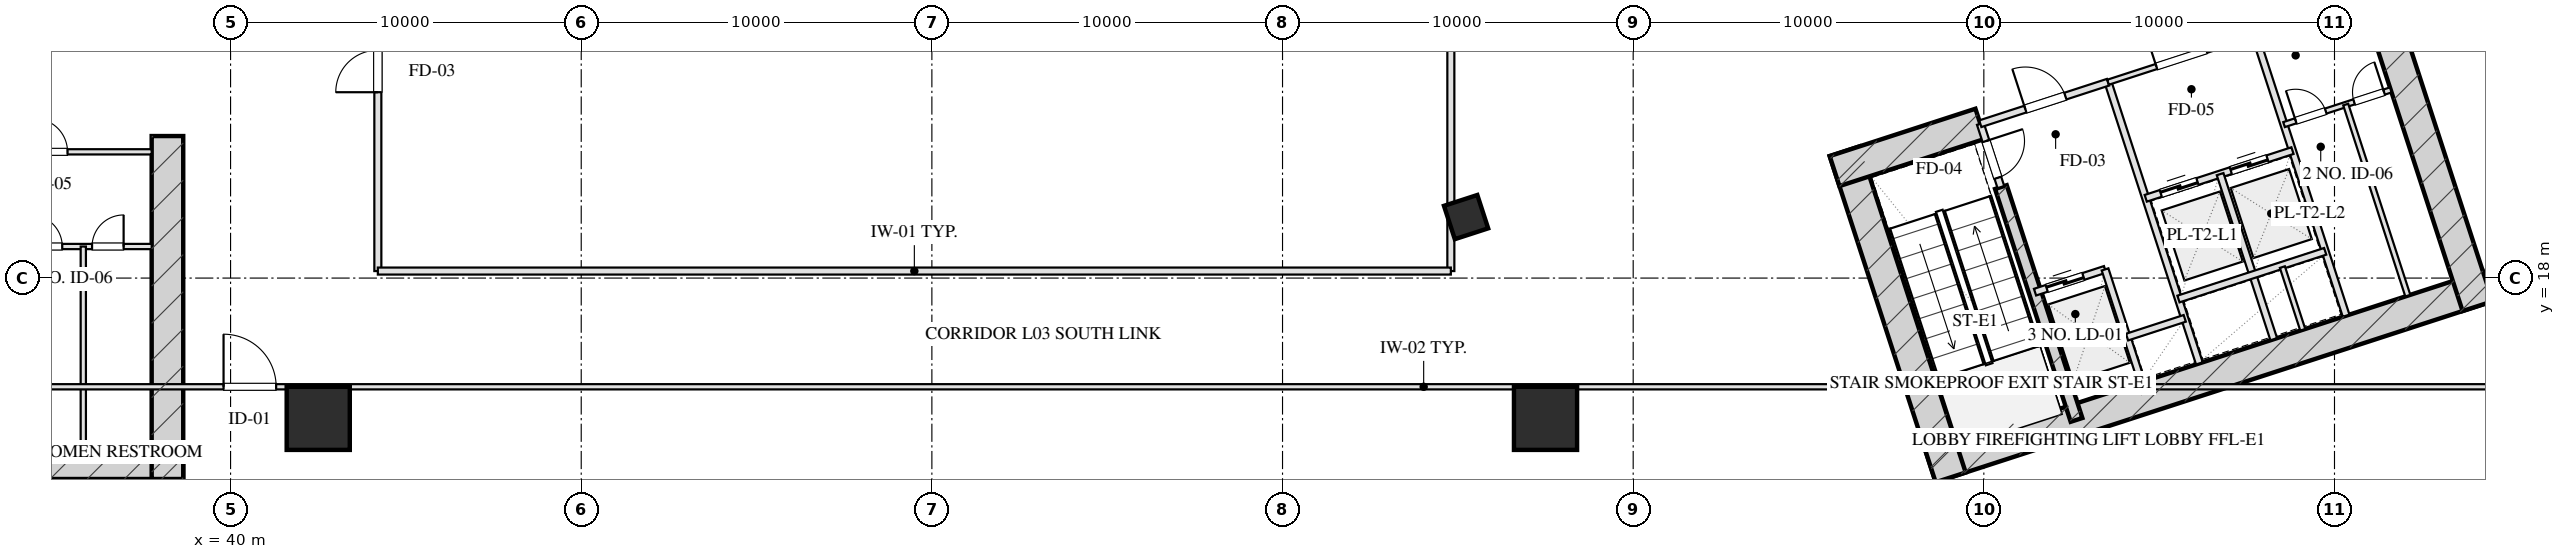
"""IFC4 building model, lengths in metres.
Left out: names, types, materials, properties, quantities, classifications, styles, units other than length and angle.
Written with IfcOpenShell. Run it as: python <this file> out.ifc"""

import sys

from ifc_helpers import new_model, si_unit, direction, frame, frame_2d, origin, origin_2d, place, context, subcontext, project, spatial, rectangle, hollow_rectangle, extrude, element, fill, save


model = new_model("IFC4")
c1 = context("Model", 3, precision=1e-05, world=origin(), true_north=direction((0.0, 1.0)))
c2 = subcontext(c1, "Body", "Model", "MODEL_VIEW")
j1 = project(units=[si_unit("LENGTHUNIT", "METRE"), si_unit("PLANEANGLEUNIT", "RADIAN")], contexts=[c1])
p1 = place(None, origin())
s1 = spatial("IfcSite", under=j1, at=p1, CompositionType="ELEMENT")
p2 = place(p1, origin())
s2 = spatial("IfcBuilding", under=s1, at=p2, CompositionType="ELEMENT")
p3 = place(p2, frame((0.0, 0.0, 16.5)))
s3 = spatial("IfcBuildingStorey", under=s2, at=p3, CompositionType="ELEMENT", Elevation=16.5)
p4 = place(p3, frame((21.35, 12.72, 0.0), z_axis=(0.0, 0.0, 1.0), x_axis=(1.0, 0.0, 0.0)))
e1 = element("IfcWall", 1, at=p4, inside=s3, PredefinedType="SHEAR", context=c2, shape_type="SweptSolid", body=[
    extrude(rectangle(XDim=17.3, YDim=0.9, at=frame_2d((8.65, 0.0))), origin(), (0.0, 0.0, 1.0), 5.5),
])
p5 = place(p3, frame((38.2, 22.05, 0.0), z_axis=(0.0, 0.0, 1.0), x_axis=(0.0, -1.0, 0.0)))
e2 = element("IfcWall", 2, at=p5, inside=s3, PredefinedType="SHEAR", context=c2, shape_type="SweptSolid", body=[
    extrude(rectangle(XDim=9.78, YDim=0.9, at=frame_2d((4.89, 0.0))), origin(), (0.0, 0.0, 1.0), 5.5),
])
p6 = place(p3, frame((88.487, 12.605, 0.0), z_axis=(0.0, 0.0, 1.0), x_axis=(0.951055016115, 0.309021611416, 0.0)))
e3 = element("IfcWall", 3, at=p6, inside=s3, PredefinedType="SHEAR", context=c2, shape_type="SweptSolid", body=[
    extrude(rectangle(XDim=16.7, YDim=0.9, at=frame_2d((8.35, 0.0))), origin(), (0.0, 0.0, 1.0), 5.5),
])
p7 = place(p3, frame((86.032, 21.618, 0.0), z_axis=(0.0, 0.0, 1.0), x_axis=(0.30901438634, -0.951057363693, 0.0)))
e4 = element("IfcWall", 4, at=p7, inside=s3, PredefinedType="SHEAR", context=c2, shape_type="SweptSolid", body=[
    extrude(rectangle(XDim=9.78, YDim=0.9, at=frame_2d((4.89, 0.0))), origin(), (0.0, 0.0, 1.0), 5.5),
])
p8 = place(p3, frame((101.059, 26.5, 0.0), z_axis=(0.0, 0.0, 1.0), x_axis=(0.309021722829, -0.951054979914, 0.0)))
e5 = element("IfcWall", 5, at=p8, inside=s3, PredefinedType="SHEAR", context=c2, shape_type="SweptSolid", body=[
    extrude(rectangle(XDim=9.78, YDim=0.9, at=frame_2d((4.89, 0.0))), origin(), (0.0, 0.0, 1.0), 5.5),
])
p9 = place(p3, frame((90.486, 20.594, 0.0), z_axis=(0.0, 0.0, 1.0), x_axis=(0.309020428229, -0.951055400562, 0.0)))
e6 = element("IfcWall", 6, at=p9, inside=s3, PredefinedType="SHEAR", context=c2, shape_type="SweptSolid", body=[
    extrude(rectangle(XDim=6.98, YDim=0.35, at=frame_2d((3.49, 0.0))), origin(), (0.0, 0.0, 1.0), 5.5),
])
p10 = place(p3, frame((85.743, 21.051, 0.0), z_axis=(0.0, 0.0, 1.0), x_axis=(0.951063623806, 0.308995118848, 0.0)))
e7 = element("IfcWall", 7, at=p10, inside=s3, PredefinedType="SHEAR", context=c2, shape_type="SweptSolid", body=[
    extrude(rectangle(XDim=4.37, YDim=0.9, at=frame_2d((2.185, 0.0))), origin(), (0.0, 0.0, 1.0), 5.5),
])
for number, where, z_axis, x_axis in (
    (8, (42.5, 14.0, 0.0), (0.0, 0.0, 1.0), (1.0, 0.0, 0.0)),
    (9, (77.5, 14.0, 0.0), (0.0, 0.0, 1.0), (1.0, 0.0, 0.0)),
):
    element("IfcColumn", number, at=place(p3, frame(where, z_axis=z_axis, x_axis=x_axis)), inside=s3, PredefinedType="COLUMN", context=c2, shape_type="SweptSolid", body=[
        extrude(hollow_rectangle(XDim=1.8, YDim=1.8, WallThickness=0.06, at=origin_2d()), origin(), (0.0, 0.0, 1.0), 5.501),
    ])
p11 = place(p3, frame((75.234, 19.739, 0.0), z_axis=(0.0, 0.0, 1.0), x_axis=(0.951056516295, 0.309016994375, 0.0)))
e10 = element("IfcColumn", 10, at=p11, inside=s3, PredefinedType="COLUMN", context=c2, shape_type="SweptSolid", body=[
    extrude(hollow_rectangle(XDim=1.0, YDim=1.0, WallThickness=0.036, at=origin_2d()), origin(), (0.0, 0.0, 1.0), 5.501),
])
p12 = place(p3, frame((33.95, 21.6, 0.0), z_axis=(0.0, 0.0, 1.0), x_axis=(1.0, 0.0, 0.0)))
e11 = element("IfcWall", 11, at=p12, inside=s3, PredefinedType="PARTITIONING", context=c2, shape_type="SweptSolid", body=[
    extrude(rectangle(XDim=3.8, YDim=0.15, at=frame_2d((1.9, 0.0))), origin(), (0.0, 0.0, 1.0), 5.185),
])
p13 = place(p12, frame((0.45, 0.0, 0.0)))
e12 = element("IfcOpeningElement", 12, at=p13, cuts=e11, PredefinedType="OPENING", context=c2, shape_type="SweptSolid", body=[
    extrude(rectangle(XDim=0.95, YDim=2.05, at=frame_2d((0.475, 1.025))), frame((0.0, 0.085, 0.0), z_axis=(0.0, -1.0, 0.0), x_axis=(1.0, 0.0, 0.0)), (0.0, 0.0, 1.0), 0.17),
])
p14 = place(p3, frame((33.95, 18.9, 0.0), z_axis=(0.0, 0.0, 1.0), x_axis=(1.0, 0.0, 0.0)))
e13 = element("IfcWall", 13, at=p14, inside=s3, PredefinedType="PARTITIONING", context=c2, shape_type="SweptSolid", body=[
    extrude(rectangle(XDim=3.8, YDim=0.15, at=frame_2d((1.9, 0.0))), origin(), (0.0, 0.0, 1.0), 5.185),
])
p15 = place(p14, frame((0.35, 0.0, 0.0)))
e14 = element("IfcOpeningElement", 14, at=p15, cuts=e13, PredefinedType="OPENING", context=c2, shape_type="SweptSolid", body=[
    extrude(rectangle(XDim=0.9, YDim=2.05, at=frame_2d((0.45, 1.025))), frame((0.0, 0.085, 0.0), z_axis=(0.0, -1.0, 0.0), x_axis=(1.0, 0.0, 0.0)), (0.0, 0.0, 1.0), 0.17),
])
p16 = place(p14, frame((2.1, 0.0, 0.0)))
e15 = element("IfcOpeningElement", 15, at=p16, cuts=e13, PredefinedType="OPENING", context=c2, shape_type="SweptSolid", body=[
    extrude(rectangle(XDim=0.9, YDim=2.05, at=frame_2d((0.45, 1.025))), frame((0.0, 0.085, 0.0), z_axis=(0.0, -1.0, 0.0), x_axis=(1.0, 0.0, 0.0)), (0.0, 0.0, 1.0), 0.17),
])
p17 = place(p3, frame((35.8, 18.9, 0.0), z_axis=(0.0, 0.0, 1.0), x_axis=(0.0, -1.0, 0.0)))
e16 = element("IfcWall", 16, at=p17, inside=s3, PredefinedType="PARTITIONING", context=c2, shape_type="SweptSolid", body=[
    extrude(rectangle(XDim=5.73, YDim=0.15, at=frame_2d((2.865, 0.0))), origin(), (0.0, 0.0, 1.0), 5.185),
])
p18 = place(p3, frame((89.899, 22.401, 0.0), z_axis=(0.0, 0.0, 1.0), x_axis=(0.308932062672, -0.951084108086, 0.0)))
e17 = element("IfcWall", 17, at=p18, inside=s3, PredefinedType="PARTITIONING", context=c2, shape_type="SweptSolid", body=[
    extrude(rectangle(XDim=1.9, YDim=0.2, at=frame_2d((0.95, 0.0))), origin(), (0.0, 0.0, 1.0), 5.185),
])
p19 = place(p18, frame((0.52, 0.0, 0.0)))
e18 = element("IfcOpeningElement", 18, at=p19, cuts=e17, PredefinedType="OPENING", context=c2, shape_type="SweptSolid", body=[
    extrude(rectangle(XDim=1.1, YDim=2.05, at=frame_2d((0.55, 1.025))), frame((0.0, 0.11, 0.0), z_axis=(0.0, -1.0, 0.0), x_axis=(1.0, 0.0, 0.0)), (0.0, 0.0, 1.0), 0.22),
])
p20 = place(p3, frame((93.542, 23.585, 0.0), z_axis=(0.0, 0.0, 1.0), x_axis=(0.309042196757, -0.951048327176, 0.0)))
e19 = element("IfcWall", 19, at=p20, inside=s3, PredefinedType="PARTITIONING", context=c2, shape_type="SweptSolid", body=[
    extrude(rectangle(XDim=8.43, YDim=0.2, at=frame_2d((4.215, 0.0))), origin(), (0.0, 0.0, 1.0), 5.185),
])
p21 = place(p3, frame((89.899, 22.401, 0.0), z_axis=(0.0, 0.0, 1.0), x_axis=(0.951046716504, 0.309047153403, 0.0)))
e20 = element("IfcWall", 20, at=p21, inside=s3, PredefinedType="PARTITIONING", context=c2, shape_type="SweptSolid", body=[
    extrude(rectangle(XDim=3.83, YDim=0.2, at=frame_2d((1.915, 0.0))), origin(), (0.0, 0.0, 1.0), 5.185),
])
p22 = place(p21, frame((1.35, 0.0, 0.0)))
e21 = element("IfcOpeningElement", 21, at=p22, cuts=e20, PredefinedType="OPENING", context=c2, shape_type="SweptSolid", body=[
    extrude(rectangle(XDim=1.2, YDim=2.05, at=frame_2d((0.6, 1.025))), frame((0.0, 0.11, 0.0), z_axis=(0.0, -1.0, 0.0), x_axis=(1.0, 0.0, 0.0)), (0.0, 0.0, 1.0), 0.22),
])
p23 = place(p3, frame((91.46, 17.598, 0.0), z_axis=(0.0, 0.0, 1.0), x_axis=(0.951062257173, 0.308999325213, 0.0)))
e22 = element("IfcWall", 22, at=p23, inside=s3, PredefinedType="PARTITIONING", context=c2, shape_type="SweptSolid", body=[
    extrude(rectangle(XDim=2.1, YDim=0.2, at=frame_2d((1.05, 0.0))), origin(), (0.0, 0.0, 1.0), 5.185),
])
p24 = place(p23, frame((0.35, 0.0, 0.0)))
e23 = element("IfcOpeningElement", 23, at=p24, cuts=e22, PredefinedType="OPENING", context=c2, shape_type="SweptSolid", body=[
    extrude(rectangle(XDim=1.1, YDim=2.05, at=frame_2d((0.55, 1.025))), frame((0.0, 0.11, 0.0), z_axis=(0.0, -1.0, 0.0), x_axis=(1.0, 0.0, 0.0)), (0.0, 0.0, 1.0), 0.22),
])
p25 = place(p3, frame((93.457, 18.247, 0.0), z_axis=(0.0, 0.0, 1.0), x_axis=(0.3089935693, -0.951064127245, 0.0)))
e24 = element("IfcWall", 24, at=p25, inside=s3, PredefinedType="PARTITIONING", context=c2, shape_type="SweptSolid", body=[
    extrude(rectangle(XDim=3.7, YDim=0.2, at=frame_2d((1.85, 0.0))), origin(), (0.0, 0.0, 1.0), 5.185),
])
p26 = place(p3, frame((94.084, 16.317, 0.0), z_axis=(0.0, 0.0, 1.0), x_axis=(0.951041328149, 0.309063734775, 0.0)))
e25 = element("IfcWall", 25, at=p26, inside=s3, PredefinedType="PARTITIONING", context=c2, shape_type="SweptSolid", body=[
    extrude(rectangle(XDim=1.73, YDim=0.2, at=frame_2d((0.865, 0.0))), origin(), (0.0, 0.0, 1.0), 5.185),
])
p27 = place(p3, frame((97.727, 24.944, 0.0), z_axis=(0.0, 0.0, 1.0), x_axis=(0.309016001439, -0.951056838919, 0.0)))
e26 = element("IfcWall", 26, at=p27, inside=s3, PredefinedType="PARTITIONING", context=c2, shape_type="SweptSolid", body=[
    extrude(rectangle(XDim=8.43, YDim=0.2, at=frame_2d((4.215, 0.0))), origin(), (0.0, 0.0, 1.0), 5.185),
])
p28 = place(p3, frame((93.542, 23.585, 0.0), z_axis=(0.0, 0.0, 1.0), x_axis=(0.951063829732, 0.308994485023, 0.0)))
e27 = element("IfcWall", 27, at=p28, inside=s3, PredefinedType="PARTITIONING", context=c2, shape_type="SweptSolid", body=[
    extrude(rectangle(XDim=4.4, YDim=0.15, at=frame_2d((2.2, 0.0))), origin(), (0.0, 0.0, 1.0), 5.185),
])
p29 = place(p28, frame((1.45, 0.0, 0.0)))
e28 = element("IfcOpeningElement", 28, at=p29, cuts=e27, PredefinedType="OPENING", context=c2, shape_type="SweptSolid", body=[
    extrude(rectangle(XDim=1.5, YDim=2.05, at=frame_2d((0.75, 1.025))), frame((0.0, 0.085, 0.0), z_axis=(0.0, -1.0, 0.0), x_axis=(1.0, 0.0, 0.0)), (0.0, 0.0, 1.0), 0.17),
])
p30 = place(p3, frame((94.617, 20.275, 0.0), z_axis=(0.0, 0.0, 1.0), x_axis=(0.951058531764, 0.30901079133, 0.0)))
e29 = element("IfcWall", 29, at=p30, inside=s3, PredefinedType="PARTITIONING", context=c2, shape_type="SweptSolid", body=[
    extrude(rectangle(XDim=4.4, YDim=0.2, at=frame_2d((2.2, 0.0))), origin(), (0.0, 0.0, 1.0), 5.185),
])
p31 = place(p30, frame((0.45, 0.0, 0.0)))
e30 = element("IfcOpeningElement", 30, at=p31, cuts=e29, PredefinedType="OPENING", context=c2, shape_type="SweptSolid", body=[
    extrude(rectangle(XDim=1.1, YDim=2.05, at=frame_2d((0.55, 1.025))), frame((0.0, 0.11, 0.0), z_axis=(0.0, -1.0, 0.0), x_axis=(1.0, 0.0, 0.0)), (0.0, 0.0, 1.0), 0.22),
])
p32 = place(p30, frame((2.55, 0.0, 0.0)))
e31 = element("IfcOpeningElement", 31, at=p32, cuts=e29, PredefinedType="OPENING", context=c2, shape_type="SweptSolid", body=[
    extrude(rectangle(XDim=1.1, YDim=2.05, at=frame_2d((0.55, 1.025))), frame((0.0, 0.11, 0.0), z_axis=(0.0, -1.0, 0.0), x_axis=(1.0, 0.0, 0.0)), (0.0, 0.0, 1.0), 0.22),
])
p33 = place(p3, frame((96.738, 20.964, 0.0), z_axis=(0.0, 0.0, 1.0), x_axis=(0.309042578481, -0.951048203135, 0.0)))
e32 = element("IfcWall", 32, at=p33, inside=s3, PredefinedType="PARTITIONING", context=c2, shape_type="SweptSolid", body=[
    extrude(rectangle(XDim=4.95, YDim=0.2, at=frame_2d((2.475, 0.0))), origin(), (0.0, 0.0, 1.0), 5.185),
])
p34 = place(p3, frame((95.551, 17.403, 0.0), z_axis=(0.0, 0.0, 1.0), x_axis=(0.951058531764, 0.30901079133, 0.0)))
e33 = element("IfcWall", 33, at=p34, inside=s3, PredefinedType="PARTITIONING", context=c2, shape_type="SweptSolid", body=[
    extrude(rectangle(XDim=4.4, YDim=0.2, at=frame_2d((2.2, 0.0))), origin(), (0.0, 0.0, 1.0), 5.185),
])
p35 = place(p3, frame((98.514, 18.313, 0.0), z_axis=(0.0, 0.0, 1.0), x_axis=(0.309089008895, -0.951033114345, 0.0)))
e34 = element("IfcWall", 34, at=p35, inside=s3, PredefinedType="PARTITIONING", context=c2, shape_type="SweptSolid", body=[
    extrude(rectangle(XDim=1.88, YDim=0.15, at=frame_2d((0.94, 0.0))), origin(), (0.0, 0.0, 1.0), 5.185),
])
p36 = place(p3, frame((98.561, 22.376, 0.0), z_axis=(0.0, 0.0, 1.0), x_axis=(0.95104415986, 0.309055020985, 0.0)))
e35 = element("IfcWall", 35, at=p36, inside=s3, PredefinedType="PARTITIONING", context=c2, shape_type="SweptSolid", body=[
    extrude(rectangle(XDim=3.2, YDim=0.15, at=frame_2d((1.6, 0.0))), origin(), (0.0, 0.0, 1.0), 5.185),
])
p37 = place(p36, frame((0.35, 0.0, 0.0)))
e36 = element("IfcOpeningElement", 36, at=p37, cuts=e35, PredefinedType="OPENING", context=c2, shape_type="SweptSolid", body=[
    extrude(rectangle(XDim=0.9, YDim=2.05, at=frame_2d((0.45, 1.025))), frame((0.0, 0.085, 0.0), z_axis=(0.0, -1.0, 0.0), x_axis=(1.0, 0.0, 0.0)), (0.0, 0.0, 1.0), 0.17),
])
p38 = place(p36, frame((2.1, 0.0, 0.0)))
e37 = element("IfcOpeningElement", 37, at=p38, cuts=e35, PredefinedType="OPENING", context=c2, shape_type="SweptSolid", body=[
    extrude(rectangle(XDim=0.9, YDim=2.05, at=frame_2d((0.45, 1.025))), frame((0.0, 0.085, 0.0), z_axis=(0.0, -1.0, 0.0), x_axis=(1.0, 0.0, 0.0)), (0.0, 0.0, 1.0), 0.17),
])
p39 = place(p3, frame((100.32, 22.948, 0.0), z_axis=(0.0, 0.0, 1.0), x_axis=(0.309035009867, -0.951050662518, 0.0)))
e38 = element("IfcWall", 38, at=p39, inside=s3, PredefinedType="PARTITIONING", context=c2, shape_type="SweptSolid", body=[
    extrude(rectangle(XDim=5.73, YDim=0.15, at=frame_2d((2.865, 0.0))), origin(), (0.0, 0.0, 1.0), 5.185),
])
p40 = place(p3, frame((44.2, 18.2, 0.0), z_axis=(0.0, 0.0, 1.0), x_axis=(0.0, 1.0, 0.0)))
e39 = element("IfcWall", 39, at=p40, inside=s3, PredefinedType="PARTITIONING", context=c2, shape_type="SweptSolid", body=[
    extrude(rectangle(XDim=31.6, YDim=0.2, at=frame_2d((15.8, 0.0))), origin(), (0.0, 0.0, 1.0), 5.185),
])
p41 = place(p40, frame((5.1, 0.0, 0.0)))
e40 = element("IfcOpeningElement", 40, at=p41, cuts=e39, PredefinedType="OPENING", context=c2, shape_type="SweptSolid", body=[
    extrude(rectangle(XDim=1.2, YDim=2.05, at=frame_2d((0.6, 1.025))), frame((0.0, 0.11, 0.0), z_axis=(0.0, -1.0, 0.0), x_axis=(1.0, 0.0, 0.0)), (0.0, 0.0, 1.0), 0.22),
])
p42 = place(p40, frame((20.0, 0.0, 0.0)))
e41 = element("IfcOpeningElement", 41, at=p42, cuts=e39, PredefinedType="OPENING", context=c2, shape_type="SweptSolid", body=[
    extrude(rectangle(XDim=1.2, YDim=2.05, at=frame_2d((0.6, 1.025))), frame((0.0, 0.11, 0.0), z_axis=(0.0, -1.0, 0.0), x_axis=(1.0, 0.0, 0.0)), (0.0, 0.0, 1.0), 0.22),
])
p43 = place(p3, frame((74.8, 18.2, 0.0), z_axis=(0.0, 0.0, 1.0), x_axis=(0.0, 1.0, 0.0)))
e42 = element("IfcWall", 42, at=p43, inside=s3, PredefinedType="PARTITIONING", context=c2, shape_type="SweptSolid", body=[
    extrude(rectangle(XDim=31.6, YDim=0.2, at=frame_2d((15.8, 0.0))), origin(), (0.0, 0.0, 1.0), 5.185),
])
p44 = place(p43, frame((23.0, 0.0, 0.0)))
e43 = element("IfcOpeningElement", 43, at=p44, cuts=e42, PredefinedType="OPENING", context=c2, shape_type="SweptSolid", body=[
    extrude(rectangle(XDim=1.2, YDim=2.05, at=frame_2d((0.6, 1.025))), frame((0.0, 0.11, 0.0), z_axis=(0.0, -1.0, 0.0), x_axis=(1.0, 0.0, 0.0)), (0.0, 0.0, 1.0), 0.22),
])
p45 = place(p3, frame((44.2, 18.2, 0.0), z_axis=(0.0, 0.0, 1.0), x_axis=(1.0, 0.0, 0.0)))
e44 = element("IfcWall", 44, at=p45, inside=s3, PredefinedType="PARTITIONING", context=c2, shape_type="SweptSolid", body=[
    extrude(rectangle(XDim=30.6, YDim=0.2, at=frame_2d((15.3, 0.0))), origin(), (0.0, 0.0, 1.0), 5.185),
])
p46 = place(p3, frame((18.0, 14.9, 0.0), z_axis=(0.0, 0.0, 1.0), x_axis=(1.0, 0.0, 0.0)))
e45 = element("IfcWall", 45, at=p46, inside=s3, PredefinedType="PARTITIONING", context=c2, shape_type="SweptSolid", body=[
    extrude(rectangle(XDim=88.0, YDim=0.15, at=frame_2d((44.0, 0.0))), origin(), (0.0, 0.0, 1.0), 2.325),
])
p47 = place(p46, frame((21.8, 0.0, 0.0)))
e46 = element("IfcOpeningElement", 46, at=p47, cuts=e45, PredefinedType="OPENING", context=c2, shape_type="SweptSolid", body=[
    extrude(rectangle(XDim=1.5, YDim=2.05, at=frame_2d((0.75, 1.025))), frame((0.0, 0.085, 0.0), z_axis=(0.0, -1.0, 0.0), x_axis=(1.0, 0.0, 0.0)), (0.0, 0.0, 1.0), 0.17),
])
p48 = place(p13, origin())
e47 = element("IfcDoor", 47, at=p48, inside=s3, OperationType="SINGLE_SWING_LEFT", PredefinedType="DOOR", context=c2, shape_type="SweptSolid", body=[
    extrude(rectangle(XDim=0.95, YDim=2.05, at=frame_2d((0.475, 1.025))), frame((0.0, 0.025, 0.0), z_axis=(0.0, -1.0, 0.0), x_axis=(1.0, 0.0, 0.0)), (0.0, 0.0, 1.0), 0.05),
])
fill(e12, e47)
p49 = place(p15, origin())
e48 = element("IfcDoor", 48, at=p49, inside=s3, OperationType="SINGLE_SWING_LEFT", PredefinedType="DOOR", context=c2, shape_type="SweptSolid", body=[
    extrude(rectangle(XDim=0.9, YDim=2.05, at=frame_2d((0.45, 1.025))), frame((0.0, 0.025, 0.0), z_axis=(0.0, -1.0, 0.0), x_axis=(1.0, 0.0, 0.0)), (0.0, 0.0, 1.0), 0.05),
])
fill(e14, e48)
p50 = place(p16, origin())
e49 = element("IfcDoor", 49, at=p50, inside=s3, OperationType="SINGLE_SWING_RIGHT", PredefinedType="DOOR", context=c2, shape_type="SweptSolid", body=[
    extrude(rectangle(XDim=0.9, YDim=2.05, at=frame_2d((0.45, 1.025))), frame((0.0, 0.025, 0.0), z_axis=(0.0, -1.0, 0.0), x_axis=(1.0, 0.0, 0.0)), (0.0, 0.0, 1.0), 0.05),
])
fill(e15, e49)
p51 = place(p19, origin())
e50 = element("IfcDoor", 50, at=p51, inside=s3, OperationType="SINGLE_SWING_LEFT", PredefinedType="DOOR", context=c2, shape_type="SweptSolid", body=[
    extrude(rectangle(XDim=1.1, YDim=2.05, at=frame_2d((0.55, 1.025))), frame((0.0, 0.025, 0.0), z_axis=(0.0, -1.0, 0.0), x_axis=(1.0, 0.0, 0.0)), (0.0, 0.0, 1.0), 0.05),
])
fill(e18, e50)
p52 = place(p22, origin())
e51 = element("IfcDoor", 51, at=p52, inside=s3, OperationType="SINGLE_SWING_LEFT", PredefinedType="DOOR", context=c2, shape_type="SweptSolid", body=[
    extrude(rectangle(XDim=1.2, YDim=2.05, at=frame_2d((0.6, 1.025))), frame((0.0, 0.025, 0.0), z_axis=(0.0, -1.0, 0.0), x_axis=(1.0, 0.0, 0.0)), (0.0, 0.0, 1.0), 0.05),
])
fill(e21, e51)
p53 = place(p24, origin())
e52 = element("IfcDoor", 52, at=p53, inside=s3, OperationType="DOUBLE_DOOR_SLIDING", PredefinedType="DOOR", context=c2, shape_type="SweptSolid", body=[
    extrude(rectangle(XDim=1.1, YDim=2.05, at=frame_2d((0.55, 1.025))), frame((0.0, 0.025, 0.0), z_axis=(0.0, -1.0, 0.0), x_axis=(1.0, 0.0, 0.0)), (0.0, 0.0, 1.0), 0.05),
])
fill(e23, e52)
p54 = place(p29, origin())
e53 = element("IfcDoor", 53, at=p54, inside=s3, OperationType="SINGLE_SWING_LEFT", PredefinedType="DOOR", context=c2, shape_type="SweptSolid", body=[
    extrude(rectangle(XDim=1.5, YDim=2.05, at=frame_2d((0.75, 1.025))), frame((0.0, 0.025, 0.0), z_axis=(0.0, -1.0, 0.0), x_axis=(1.0, 0.0, 0.0)), (0.0, 0.0, 1.0), 0.05),
])
fill(e28, e53)
p55 = place(p31, origin())
e54 = element("IfcDoor", 54, at=p55, inside=s3, OperationType="DOUBLE_DOOR_SLIDING", PredefinedType="DOOR", context=c2, shape_type="SweptSolid", body=[
    extrude(rectangle(XDim=1.1, YDim=2.05, at=frame_2d((0.55, 1.025))), frame((0.0, 0.025, 0.0), z_axis=(0.0, -1.0, 0.0), x_axis=(1.0, 0.0, 0.0)), (0.0, 0.0, 1.0), 0.05),
])
fill(e30, e54)
p56 = place(p32, origin())
e55 = element("IfcDoor", 55, at=p56, inside=s3, OperationType="DOUBLE_DOOR_SLIDING", PredefinedType="DOOR", context=c2, shape_type="SweptSolid", body=[
    extrude(rectangle(XDim=1.1, YDim=2.05, at=frame_2d((0.55, 1.025))), frame((0.0, 0.025, 0.0), z_axis=(0.0, -1.0, 0.0), x_axis=(1.0, 0.0, 0.0)), (0.0, 0.0, 1.0), 0.05),
])
fill(e31, e55)
p57 = place(p37, origin())
e56 = element("IfcDoor", 56, at=p57, inside=s3, OperationType="SINGLE_SWING_LEFT", PredefinedType="DOOR", context=c2, shape_type="SweptSolid", body=[
    extrude(rectangle(XDim=0.9, YDim=2.05, at=frame_2d((0.45, 1.025))), frame((0.0, 0.025, 0.0), z_axis=(0.0, -1.0, 0.0), x_axis=(1.0, 0.0, 0.0)), (0.0, 0.0, 1.0), 0.05),
])
fill(e36, e56)
p58 = place(p38, origin())
e57 = element("IfcDoor", 57, at=p58, inside=s3, OperationType="SINGLE_SWING_RIGHT", PredefinedType="DOOR", context=c2, shape_type="SweptSolid", body=[
    extrude(rectangle(XDim=0.9, YDim=2.05, at=frame_2d((0.45, 1.025))), frame((0.0, 0.025, 0.0), z_axis=(0.0, -1.0, 0.0), x_axis=(1.0, 0.0, 0.0)), (0.0, 0.0, 1.0), 0.05),
])
fill(e37, e57)
p59 = place(p41, origin())
e58 = element("IfcDoor", 58, at=p59, inside=s3, OperationType="SINGLE_SWING_LEFT", PredefinedType="DOOR", context=c2, shape_type="SweptSolid", body=[
    extrude(rectangle(XDim=1.2, YDim=2.05, at=frame_2d((0.6, 1.025))), frame((0.0, 0.025, 0.0), z_axis=(0.0, -1.0, 0.0), x_axis=(1.0, 0.0, 0.0)), (0.0, 0.0, 1.0), 0.05),
])
fill(e40, e58)
p60 = place(p47, origin())
e59 = element("IfcDoor", 59, at=p60, inside=s3, OperationType="SINGLE_SWING_LEFT", PredefinedType="DOOR", context=c2, shape_type="SweptSolid", body=[
    extrude(rectangle(XDim=1.5, YDim=2.05, at=frame_2d((0.75, 1.025))), frame((0.0, 0.025, 0.0), z_axis=(0.0, -1.0, 0.0), x_axis=(1.0, 0.0, 0.0)), (0.0, 0.0, 1.0), 0.05),
])
fill(e46, e59)
save(model, sys.argv[1])
